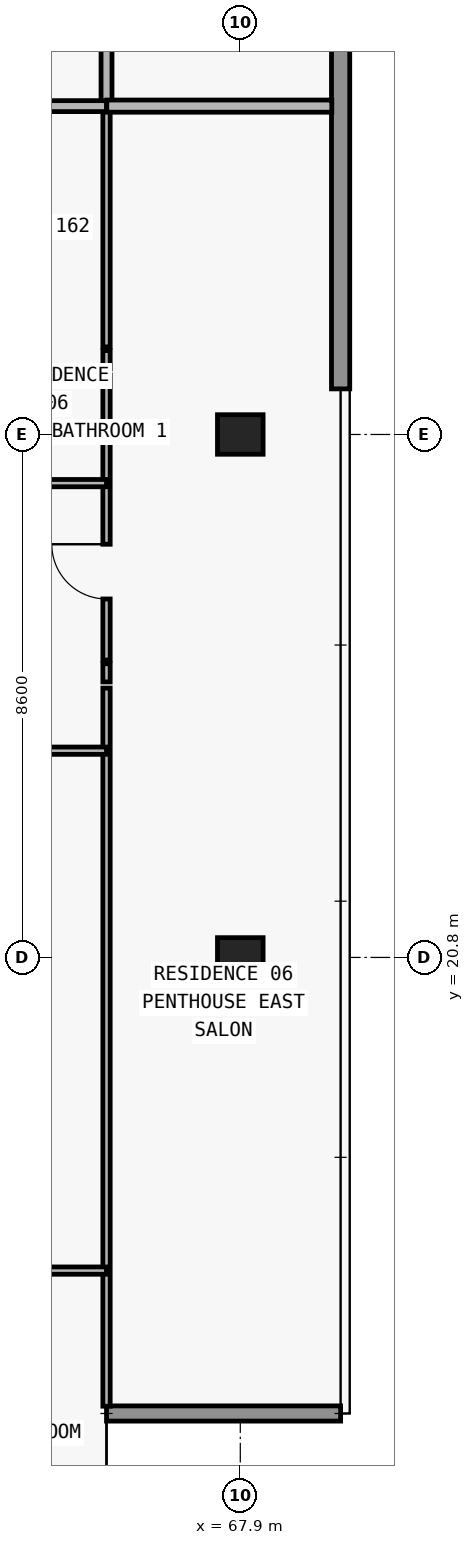
"""IFC4 building model, lengths in metres.
Left out: names, types, materials, properties, quantities, classifications, styles, units other than length and angle.
Written with IfcOpenShell. Run it as: python <this file> out.ifc"""

import sys

from ifc_helpers import new_model, si_unit, direction, frame, frame_2d, origin, origin_2d, place, context, subcontext, project, spatial, rectangle, extrude, element, fill, save


model = new_model("IFC4")
c1 = context("Model", 3, precision=1e-05, world=origin(), true_north=direction((0.0, 1.0)))
c2 = subcontext(c1, "Body", "Model", "MODEL_VIEW")
j1 = project(units=[si_unit("LENGTHUNIT", "METRE"), si_unit("PLANEANGLEUNIT", "RADIAN")], contexts=[c1])
p1 = place(None, origin())
s1 = spatial("IfcSite", under=j1, at=p1, CompositionType="ELEMENT")
p2 = place(p1, origin())
s2 = spatial("IfcBuilding", under=s1, at=p2, CompositionType="ELEMENT")
p3 = place(p2, frame((0.0, 0.0, 262.8)))
s3 = spatial("IfcBuildingStorey", under=s2, at=p3, CompositionType="ELEMENT", Elevation=262.8)
for number, where, z_axis, x_axis in (
    (1, (67.9, 20.8, 0.0), (0.0, 0.0, 1.0), (1.0, 0.0, 0.0)),
    (2, (67.9, 29.4, 0.0), (0.0, 0.0, 1.0), (1.0, 0.0, 0.0)),
):
    element("IfcColumn", number, at=place(p3, frame(where, z_axis=z_axis, x_axis=x_axis)), inside=s3, PredefinedType="COLUMN", context=c2, shape_type="SweptSolid", body=[
        extrude(rectangle(XDim=0.75, YDim=0.65, at=origin_2d()), origin(), (0.0, 0.0, 1.0), 3.05),
    ])
p4 = place(p3, frame((65.7, 13.3, 0.0), z_axis=(0.0, 0.0, 1.0), x_axis=(1.0, 0.0, 0.0)))
e3 = element("IfcWall", 3, at=p4, inside=s3, PredefinedType="ELEMENTEDWALL", context=c2, shape_type="SweptSolid", body=[
    extrude(rectangle(XDim=3.85, YDim=0.25, at=frame_2d((1.925, 0.0))), origin(), (0.0, 0.0, 1.0), 3.05),
])
p5 = place(p3, frame((69.55, 47.0, 0.0), z_axis=(0.0, 0.0, 1.0), x_axis=(0.0, -1.0, 0.0)))
e4 = element("IfcWall", 4, at=p5, inside=s3, PredefinedType="STANDARD", context=c2, shape_type="SweptSolid", body=[
    extrude(rectangle(XDim=16.85, YDim=0.3, at=frame_2d((8.425, 0.0))), origin(), (0.0, 0.0, 1.0), 3.05),
])
p6 = place(p3, frame((65.7, 13.42, 0.0), z_axis=(0.0, 0.0, 1.0), x_axis=(0.0, 1.0, 0.0)))
e5 = element("IfcWall", 5, at=p6, inside=s3, PredefinedType="PARTITIONING", context=c2, shape_type="SweptSolid", body=[
    extrude(rectangle(XDim=11.81, YDim=0.12, at=frame_2d((5.905, 0.0))), origin(), (0.0, 0.0, 1.0), 2.629),
])
p7 = place(p3, frame((65.7, 25.33, 0.0), z_axis=(0.0, 0.0, 1.0), x_axis=(0.0, 1.0, 0.0)))
e6 = element("IfcWall", 6, at=p7, inside=s3, PredefinedType="PARTITIONING", context=c2, shape_type="SweptSolid", body=[
    extrude(rectangle(XDim=0.3, YDim=0.12, at=frame_2d((0.15, 0.0))), origin(), (0.0, 0.0, 1.0), 2.629),
])
p8 = place(p3, frame((65.7, 25.69, 0.0), z_axis=(0.0, 0.0, 1.0), x_axis=(0.0, 1.0, 0.0)))
e7 = element("IfcWall", 7, at=p8, inside=s3, PredefinedType="PARTITIONING", context=c2, shape_type="SweptSolid", body=[
    extrude(rectangle(XDim=4.69, YDim=0.12, at=frame_2d((2.345, 0.0))), origin(), (0.0, 0.0, 1.0), 2.629),
])
p9 = place(p8, frame((1.005, 0.0, 0.0)))
e8 = element("IfcOpeningElement", 8, at=p9, cuts=e7, PredefinedType="OPENING", context=c2, shape_type="SweptSolid", body=[
    extrude(rectangle(XDim=0.9, YDim=2.15, at=frame_2d((0.45, 1.075))), frame((0.0, 0.07, 0.0), z_axis=(0.0, -1.0, 0.0), x_axis=(1.0, 0.0, 0.0)), (0.0, 0.0, 1.0), 0.14),
])
p10 = place(p3, frame((65.7, 30.48, 0.0), z_axis=(0.0, 0.0, 1.0), x_axis=(0.0, 1.0, 0.0)))
e9 = element("IfcWall", 9, at=p10, inside=s3, PredefinedType="PARTITIONING", context=c2, shape_type="SweptSolid", body=[
    extrude(rectangle(XDim=0.3, YDim=0.12, at=frame_2d((0.15, 0.0))), origin(), (0.0, 0.0, 1.0), 2.629),
])
p11 = place(p3, frame((65.7, 30.84, 0.0), z_axis=(0.0, 0.0, 1.0), x_axis=(0.0, 1.0, 0.0)))
e10 = element("IfcWall", 10, at=p11, inside=s3, PredefinedType="PARTITIONING", context=c2, shape_type="SweptSolid", body=[
    extrude(rectangle(XDim=3.96, YDim=0.12, at=frame_2d((1.98, 0.0))), origin(), (0.0, 0.0, 1.0), 2.629),
])
p12 = place(p3, frame((65.7, 34.805, 0.0), z_axis=(0.0, 0.0, 1.0), x_axis=(0.0, 1.0, 0.0)))
e11 = element("IfcWall", 11, at=p12, inside=s3, PredefinedType="PARTITIONING", context=c2, shape_type="SweptSolid", body=[
    extrude(rectangle(XDim=2.195, YDim=0.18, at=frame_2d((1.098, 0.0))), origin(), (0.0, 0.0, 1.0), 2.629),
])
p13 = place(p3, frame((59.5, 15.65, 0.0), z_axis=(0.0, 0.0, 1.0), x_axis=(1.0, 0.0, 0.0)))
e12 = element("IfcWall", 12, at=p13, inside=s3, PredefinedType="PARTITIONING", context=c2, shape_type="SweptSolid", body=[
    extrude(rectangle(XDim=6.2, YDim=0.12, at=frame_2d((3.1, 0.0))), origin(), (0.0, 0.0, 1.0), 3.05),
])
p14 = place(p13, frame((2.65, 0.0, 0.0)))
e13 = element("IfcOpeningElement", 13, at=p14, cuts=e12, PredefinedType="OPENING", context=c2, shape_type="SweptSolid", body=[
    extrude(rectangle(XDim=0.9, YDim=2.15, at=frame_2d((0.45, 1.075))), frame((0.0, 0.07, 0.0), z_axis=(0.0, -1.0, 0.0), x_axis=(1.0, 0.0, 0.0)), (0.0, 0.0, 1.0), 0.14),
])
p15 = place(p3, frame((59.505, 24.2, 0.0), z_axis=(0.0, 0.0, 1.0), x_axis=(1.0, 0.0, 0.0)))
e14 = element("IfcWall", 14, at=p15, inside=s3, PredefinedType="PARTITIONING", context=c2, shape_type="SweptSolid", body=[
    extrude(rectangle(XDim=6.195, YDim=0.12, at=frame_2d((3.098, 0.0))), origin(), (0.0, 0.0, 1.0), 3.05),
])
p16 = place(p15, frame((2.647, 0.0, 0.0)))
e15 = element("IfcOpeningElement", 15, at=p16, cuts=e14, PredefinedType="OPENING", context=c2, shape_type="SweptSolid", body=[
    extrude(rectangle(XDim=0.9, YDim=2.15, at=frame_2d((0.45, 1.075))), frame((0.0, 0.07, 0.0), z_axis=(0.0, -1.0, 0.0), x_axis=(1.0, 0.0, 0.0)), (0.0, 0.0, 1.0), 0.14),
])
p17 = place(p3, frame((59.5, 28.6, 0.0), z_axis=(0.0, 0.0, 1.0), x_axis=(1.0, 0.0, 0.0)))
e16 = element("IfcWall", 16, at=p17, inside=s3, PredefinedType="PARTITIONING", context=c2, shape_type="SweptSolid", body=[
    extrude(rectangle(XDim=6.2, YDim=0.12, at=frame_2d((3.1, 0.0))), origin(), (0.0, 0.0, 1.0), 3.05),
])
p18 = place(p17, frame((1.835, 0.0, 0.0)))
e17 = element("IfcOpeningElement", 17, at=p18, cuts=e16, PredefinedType="OPENING", context=c2, shape_type="SweptSolid", body=[
    extrude(rectangle(XDim=0.9, YDim=2.15, at=frame_2d((0.45, 1.075))), frame((0.0, 0.07, 0.0), z_axis=(0.0, -1.0, 0.0), x_axis=(1.0, 0.0, 0.0)), (0.0, 0.0, 1.0), 0.14),
])
p19 = place(p3, frame((31.5, 34.8, 0.0), z_axis=(0.0, 0.0, 1.0), x_axis=(1.0, 0.0, 0.0)))
e18 = element("IfcWall", 18, at=p19, inside=s3, PredefinedType="PARTITIONING", context=c2, shape_type="SweptSolid", body=[
    extrude(rectangle(XDim=34.2, YDim=0.18, at=frame_2d((17.1, 0.0))), origin(), (0.0, 0.0, 1.0), 3.05),
])
p20 = place(p19, frame((5.6, 0.0, 0.0)))
e19 = element("IfcOpeningElement", 19, at=p20, cuts=e18, PredefinedType="OPENING", context=c2, shape_type="SweptSolid", body=[
    extrude(rectangle(XDim=1.0, YDim=2.2, at=frame_2d((0.5, 1.1))), frame((0.0, 0.1, 0.0), z_axis=(0.0, -1.0, 0.0), x_axis=(1.0, 0.0, 0.0)), (0.0, 0.0, 1.0), 0.2),
])
p21 = place(p19, frame((13.799, 0.0, 0.0)))
e20 = element("IfcOpeningElement", 20, at=p21, cuts=e18, PredefinedType="OPENING", context=c2, shape_type="SweptSolid", body=[
    extrude(rectangle(XDim=1.0, YDim=2.2, at=frame_2d((0.5, 1.1))), frame((0.0, 0.1, 0.0), z_axis=(0.0, -1.0, 0.0), x_axis=(1.0, 0.0, 0.0)), (0.0, 0.0, 1.0), 0.2),
])
p22 = place(p19, frame((22.483, 0.0, 0.0)))
e21 = element("IfcOpeningElement", 21, at=p22, cuts=e18, PredefinedType="OPENING", context=c2, shape_type="SweptSolid", body=[
    extrude(rectangle(XDim=1.0, YDim=2.2, at=frame_2d((0.5, 1.1))), frame((0.0, 0.1, 0.0), z_axis=(0.0, -1.0, 0.0), x_axis=(1.0, 0.0, 0.0)), (0.0, 0.0, 1.0), 0.2),
])
p23 = place(p3, frame((65.705, 34.8, 0.0), z_axis=(0.0, 0.0, 1.0), x_axis=(1.0, 0.0, 0.0)))
e22 = element("IfcWall", 22, at=p23, inside=s3, PredefinedType="PARTITIONING", context=c2, shape_type="SweptSolid", body=[
    extrude(rectangle(XDim=3.7, YDim=0.2, at=frame_2d((1.85, 0.0))), origin(), (0.0, 0.0, 1.0), 3.05),
])
p24 = place(p9, origin())
e23 = element("IfcDoor", 23, at=p24, inside=s3, OperationType="SINGLE_SWING_RIGHT", PredefinedType="DOOR", context=c2, shape_type="SweptSolid", body=[
    extrude(rectangle(XDim=0.9, YDim=2.15, at=frame_2d((0.45, 1.075))), frame((0.0, 0.025, 0.0), z_axis=(0.0, -1.0, 0.0), x_axis=(1.0, 0.0, 0.0)), (0.0, 0.0, 1.0), 0.05),
])
fill(e8, e23)
save(model, sys.argv[1])
